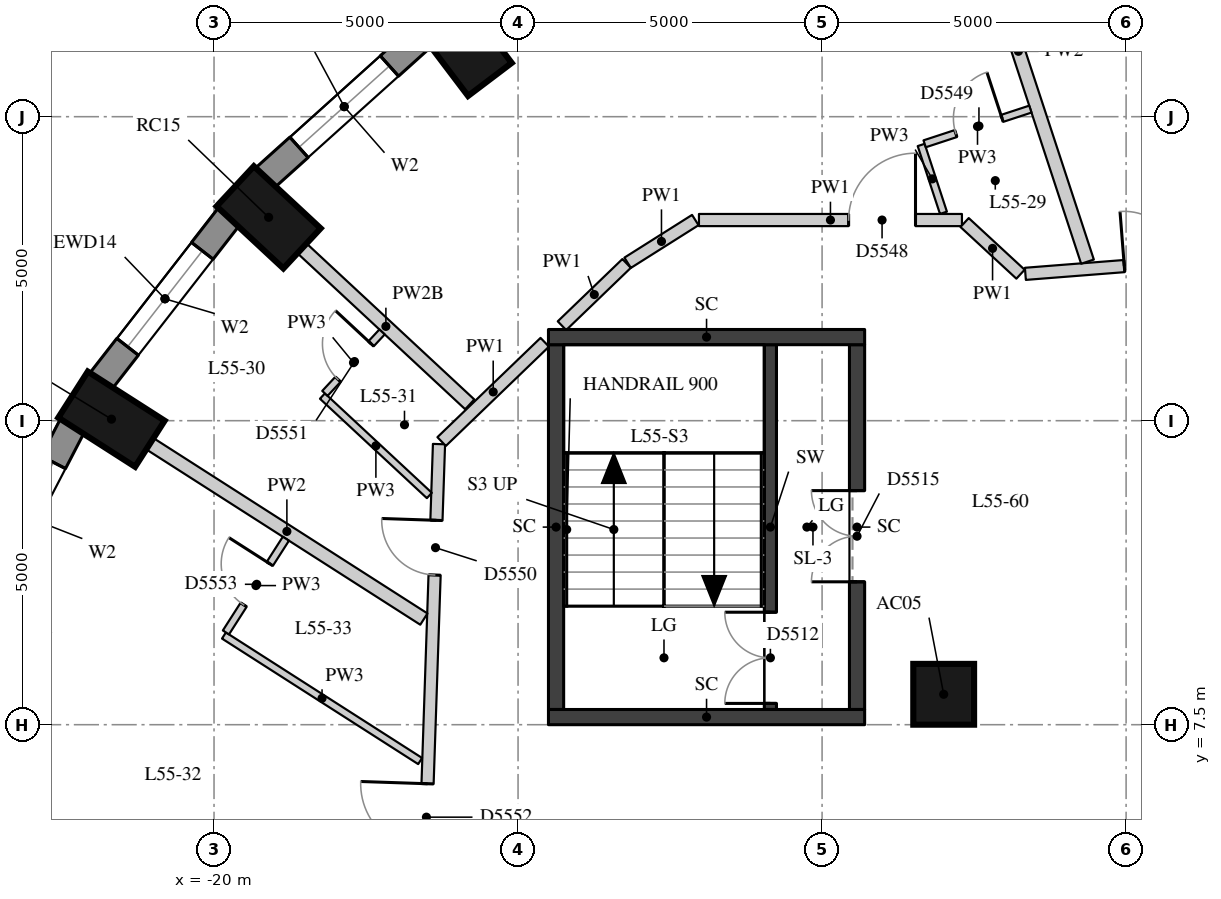
"""IFC4 building model, lengths in metres.
Left out: names, types, materials, properties, quantities, classifications, styles, units other than length and angle.
Written with IfcOpenShell. Run it as: python <this file> out.ifc"""

import sys

from ifc_helpers import new_model, si_unit, direction, frame, frame_2d, origin, origin_2d, place, context, subcontext, project, spatial, rectangle, extrude, element, fill, save


model = new_model("IFC4")
c1 = context("Model", 3, precision=1e-05, world=origin(), true_north=direction((0.0, 1.0)))
c2 = subcontext(c1, "Body", "Model", "MODEL_VIEW")
j1 = project(units=[si_unit("LENGTHUNIT", "METRE"), si_unit("PLANEANGLEUNIT", "RADIAN")], contexts=[c1])
p1 = place(None, origin())
s1 = spatial("IfcSite", under=j1, at=p1, CompositionType="ELEMENT")
p2 = place(p1, origin())
s2 = spatial("IfcBuilding", under=s1, at=p2, CompositionType="ELEMENT")
p3 = place(p2, frame((0.0, 0.0, 195.8)))
s3 = spatial("IfcBuildingStorey", under=s2, at=p3, CompositionType="ELEMENT", Elevation=195.8)
for number, where, z_axis, x_axis in (
    (1, (-15.916, 18.71, 0.0), (0.0, 0.0, 1.0), (-0.604, 0.797, 0.0)),
    (2, (-19.102, 15.845, 0.0), (0.0, 0.0, 1.0), (-0.732, 0.681, 0.0)),
    (3, (-21.687, 12.525, 0.0), (0.0, 0.0, 1.0), (-0.842, 0.539, 0.0)),
):
    element("IfcColumn", number, at=place(p3, frame(where, z_axis=z_axis, x_axis=x_axis)), inside=s3, PredefinedType="COLUMN", context=c2, shape_type="SweptSolid", body=[
        extrude(rectangle(XDim=1.5, YDim=0.9, at=origin_2d()), origin(), (0.0, 0.0, 1.0), 3.3),
    ])
p4 = place(p3, frame((-8.0, 8.0, 0.0), z_axis=(0.0, 0.0, 1.0), x_axis=(1.0, 0.0, 0.0)))
e4 = element("IfcColumn", 4, at=p4, inside=s3, PredefinedType="COLUMN", context=c2, shape_type="SweptSolid", body=[
    extrude(rectangle(XDim=1.0, YDim=1.0, at=origin_2d()), origin(), (0.0, 0.0, 1.0), 3.3),
])
p5 = place(p3, frame((-16.553, 18.84, 0.0), z_axis=(0.0, 0.0, 1.0), x_axis=(-0.743442727602, -0.668799604348, 0.0)))
e5 = element("IfcWall", 5, at=p5, inside=s3, PredefinedType="SOLIDWALL", context=c2, shape_type="SweptSolid", body=[
    extrude(rectangle(XDim=3.513, YDim=0.45, at=frame_2d((1.756, 0.0))), origin(), (0.0, 0.0, 1.0), 3.02),
])
p6 = place(p5, frame((0.756, 0.0, 0.4)))
e6 = element("IfcOpeningElement", 6, at=p6, cuts=e5, PredefinedType="OPENING", context=c2, shape_type="SweptSolid", body=[
    extrude(rectangle(XDim=2.0, YDim=1.75, at=frame_2d((1.0, 0.875))), frame((0.0, 0.235, 0.0), z_axis=(0.0, -1.0, 0.0), x_axis=(1.0, 0.0, 0.0)), (0.0, 0.0, 1.0), 0.47),
])
p7 = place(p3, frame((-19.751, 15.861, 0.0), z_axis=(0.0, 0.0, 1.0), x_axis=(-0.614220816451, -0.789134201919, 0.0)))
e7 = element("IfcWall", 7, at=p7, inside=s3, PredefinedType="SOLIDWALL", context=c2, shape_type="SweptSolid", body=[
    extrude(rectangle(XDim=3.438, YDim=0.45, at=frame_2d((1.719, 0.0))), origin(), (0.0, 0.0, 1.0), 3.02),
])
p8 = place(p7, frame((0.719, 0.0, 0.4)))
e8 = element("IfcOpeningElement", 8, at=p8, cuts=e7, PredefinedType="OPENING", context=c2, shape_type="SweptSolid", body=[
    extrude(rectangle(XDim=2.0, YDim=1.75, at=frame_2d((1.0, 0.875))), frame((0.0, 0.235, 0.0), z_axis=(0.0, -1.0, 0.0), x_axis=(1.0, 0.0, 0.0)), (0.0, 0.0, 1.0), 0.47),
])
p9 = place(p3, frame((-22.327, 12.424, 0.0), z_axis=(0.0, 0.0, 1.0), x_axis=(-0.460232593174, -0.887798378113, 0.0)))
e9 = element("IfcWall", 9, at=p9, inside=s3, PredefinedType="SOLIDWALL", context=c2, shape_type="SweptSolid", body=[
    extrude(rectangle(XDim=3.371, YDim=0.45, at=frame_2d((1.685, 0.0))), origin(), (0.0, 0.0, 1.0), 3.02),
])
p10 = place(p9, frame((0.685, 0.0, 0.4)))
e10 = element("IfcOpeningElement", 10, at=p10, cuts=e9, PredefinedType="OPENING", context=c2, shape_type="SweptSolid", body=[
    extrude(rectangle(XDim=2.0, YDim=1.75, at=frame_2d((1.0, 0.875))), frame((0.0, 0.235, 0.0), z_axis=(0.0, -1.0, 0.0), x_axis=(1.0, 0.0, 0.0)), (0.0, 0.0, 1.0), 0.47),
])
p11 = place(p3, frame((-10.85, 7.75, 0.0), z_axis=(0.0, 0.0, 1.0), x_axis=(0.0, 1.0, 0.0)))
e11 = element("IfcWall", 11, at=p11, inside=s3, PredefinedType="SHEAR", context=c2, shape_type="SweptSolid", body=[
    extrude(rectangle(XDim=6.0, YDim=0.2, at=frame_2d((3.0, 0.0))), origin(), (0.0, 0.0, 1.0), 3.02),
])
p12 = place(p11, frame((0.1, 0.0, 0.0)))
e12 = element("IfcOpeningElement", 12, at=p12, cuts=e11, PredefinedType="OPENING", context=c2, shape_type="SweptSolid", body=[
    extrude(rectangle(XDim=1.5, YDim=2.1, at=frame_2d((0.75, 1.05))), frame((0.0, 0.11, 0.0), z_axis=(0.0, -1.0, 0.0), x_axis=(1.0, 0.0, 0.0)), (0.0, 0.0, 1.0), 0.22),
])
p13 = place(p3, frame((-14.375, 7.75, -0.28), z_axis=(0.0, 0.0, 1.0), x_axis=(0.0, 1.0, 0.0)))
e13 = element("IfcWall", 13, at=p13, inside=s3, PredefinedType="SHEAR", context=c2, shape_type="SweptSolid", body=[
    extrude(rectangle(XDim=6.0, YDim=0.25, at=frame_2d((3.0, 0.0))), origin(), (0.0, 0.0, 1.0), 3.3),
])
p14 = place(p3, frame((-9.425, 7.75, -0.28), z_axis=(0.0, 0.0, 1.0), x_axis=(0.0, 1.0, 0.0)))
e14 = element("IfcWall", 14, at=p14, inside=s3, PredefinedType="SHEAR", context=c2, shape_type="SweptSolid", body=[
    extrude(rectangle(XDim=6.0, YDim=0.25, at=frame_2d((3.0, 0.0))), origin(), (0.0, 0.0, 1.0), 3.3),
])
p15 = place(p14, frame((2.1, 0.0, 0.28)))
e15 = element("IfcOpeningElement", 15, at=p15, cuts=e14, PredefinedType="OPENING", context=c2, shape_type="SweptSolid", body=[
    extrude(rectangle(XDim=1.5, YDim=2.1, at=frame_2d((0.75, 1.05))), frame((0.0, 0.135, 0.0), z_axis=(0.0, -1.0, 0.0), x_axis=(1.0, 0.0, 0.0)), (0.0, 0.0, 1.0), 0.27),
])
for number, where, z_axis, x_axis in (
    (16, (-14.5, 13.875, -0.28), (0.0, 0.0, 1.0), (1.0, 0.0, 0.0)),
    (17, (-14.5, 7.625, -0.28), (0.0, 0.0, 1.0), (1.0, 0.0, 0.0)),
):
    element("IfcWall", number, at=place(p3, frame(where, z_axis=z_axis, x_axis=x_axis)), inside=s3, PredefinedType="SHEAR", context=c2, shape_type="SweptSolid", body=[
        extrude(rectangle(XDim=5.2, YDim=0.25, at=frame_2d((2.6, 0.0))), origin(), (0.0, 0.0, 1.0), 3.3),
    ])
p16 = place(p3, frame((-16.76, -1.521, 0.0), z_axis=(0.0, 0.0, 1.0), x_axis=(0.033695560079, 0.999432143385, 0.0)))
e18 = element("IfcWall", 18, at=p16, inside=s3, PredefinedType="PARTITIONING", context=c2, shape_type="SweptSolid", body=[
    extrude(rectangle(XDim=13.643, YDim=0.2, at=frame_2d((6.822, 0.0))), origin(), (0.0, 0.0, 1.0), 3.02),
])
p17 = place(p16, frame((11.489, 0.0, 0.0)))
e19 = element("IfcOpeningElement", 19, at=p17, cuts=e18, PredefinedType="OPENING", context=c2, shape_type="SweptSolid", body=[
    extrude(rectangle(XDim=0.9, YDim=2.1, at=frame_2d((0.45, 1.05))), frame((0.0, 0.11, 0.0), z_axis=(0.0, -1.0, 0.0), x_axis=(1.0, 0.0, 0.0)), (0.0, 0.0, 1.0), 0.22),
])
p18 = place(p16, frame((6.954, 0.0, 0.0)))
e20 = element("IfcOpeningElement", 20, at=p18, cuts=e18, PredefinedType="OPENING", context=c2, shape_type="SweptSolid", body=[
    extrude(rectangle(XDim=1.1, YDim=2.1, at=frame_2d((0.55, 1.05))), frame((0.0, 0.11, 0.0), z_axis=(0.0, -1.0, 0.0), x_axis=(1.0, 0.0, 0.0)), (0.0, 0.0, 1.0), 0.22),
])
p19 = place(p16, frame((2.39, 0.0, 0.0)))
e21 = element("IfcOpeningElement", 21, at=p19, cuts=e18, PredefinedType="OPENING", context=c2, shape_type="SweptSolid", body=[
    extrude(rectangle(XDim=0.9, YDim=2.1, at=frame_2d((0.45, 1.05))), frame((0.0, 0.11, 0.0), z_axis=(0.0, -1.0, 0.0), x_axis=(1.0, 0.0, 0.0)), (0.0, 0.0, 1.0), 0.22),
])
p20 = place(p3, frame((-16.257, 12.157, 0.0), z_axis=(0.0, 0.0, 1.0), x_axis=(0.720356671174, 0.693603825174, 0.0)))
e22 = element("IfcWall", 22, at=p20, inside=s3, PredefinedType="PARTITIONING", context=c2, shape_type="SweptSolid", body=[
    extrude(rectangle(XDim=2.354, YDim=0.2, at=frame_2d((1.177, 0.0))), origin(), (0.0, 0.0, 1.0), 3.02),
])
p21 = place(p3, frame((-14.278, 14.062, 0.0), z_axis=(0.0, 0.0, 1.0), x_axis=(0.720213092954, 0.693752910435, 0.0)))
e23 = element("IfcWall", 23, at=p21, inside=s3, PredefinedType="PARTITIONING", context=c2, shape_type="SweptSolid", body=[
    extrude(rectangle(XDim=1.476, YDim=0.2, at=frame_2d((0.738, 0.0))), origin(), (0.0, 0.0, 1.0), 3.02),
])
p22 = place(p3, frame((-13.198, 15.097, 0.0), z_axis=(0.0, 0.0, 1.0), x_axis=(0.845466863805, 0.534027885234, 0.0)))
e24 = element("IfcWall", 24, at=p22, inside=s3, PredefinedType="PARTITIONING", context=c2, shape_type="SweptSolid", body=[
    extrude(rectangle(XDim=1.316, YDim=0.2, at=frame_2d((0.658, 0.0))), origin(), (0.0, 0.0, 1.0), 3.02),
])
p23 = place(p3, frame((-12.025, 15.8, 0.0), z_axis=(0.0, 0.0, 1.0), x_axis=(1.0, 0.0, 0.0)))
e25 = element("IfcWall", 25, at=p23, inside=s3, PredefinedType="PARTITIONING", context=c2, shape_type="SweptSolid", body=[
    extrude(rectangle(XDim=4.325, YDim=0.2, at=frame_2d((2.163, 0.0))), origin(), (0.0, 0.0, 1.0), 3.02),
])
p24 = place(p23, frame((2.461, 0.0, 0.0)))
e26 = element("IfcOpeningElement", 26, at=p24, cuts=e25, PredefinedType="OPENING", context=c2, shape_type="SweptSolid", body=[
    extrude(rectangle(XDim=1.1, YDim=2.1, at=frame_2d((0.55, 1.05))), frame((0.0, 0.11, 0.0), z_axis=(0.0, -1.0, 0.0), x_axis=(1.0, 0.0, 0.0)), (0.0, 0.0, 1.0), 0.22),
])
p25 = place(p3, frame((-7.656, 15.759, 0.0), z_axis=(0.0, 0.0, 1.0), x_axis=(0.734444455547, -0.678668801196, 0.0)))
e27 = element("IfcWall", 27, at=p25, inside=s3, PredefinedType="PARTITIONING", context=c2, shape_type="SweptSolid", body=[
    extrude(rectangle(XDim=1.252, YDim=0.2, at=frame_2d((0.626, 0.0))), origin(), (0.0, 0.0, 1.0), 3.02),
])
p26 = place(p3, frame((-6.656, 14.915, 0.0), z_axis=(0.0, 0.0, 1.0), x_axis=(0.99693112817, 0.07828362335, 0.0)))
e28 = element("IfcWall", 28, at=p26, inside=s3, PredefinedType="PARTITIONING", context=c2, shape_type="SweptSolid", body=[
    extrude(rectangle(XDim=10.61, YDim=0.2, at=frame_2d((5.305, 0.0))), origin(), (0.0, 0.0, 1.0), 2.42),
])
p27 = place(p26, frame((7.773, 0.0, 0.0)))
e29 = element("IfcOpeningElement", 29, at=p27, cuts=e28, PredefinedType="OPENING", context=c2, shape_type="SweptSolid", body=[
    extrude(rectangle(XDim=0.9, YDim=2.1, at=frame_2d((0.45, 1.05))), frame((0.0, 0.11, 0.0), z_axis=(0.0, -1.0, 0.0), x_axis=(1.0, 0.0, 0.0)), (0.0, 0.0, 1.0), 0.22),
])
p28 = place(p26, frame((4.608, 0.0, 0.0)))
e30 = element("IfcOpeningElement", 30, at=p28, cuts=e28, PredefinedType="OPENING", context=c2, shape_type="SweptSolid", body=[
    extrude(rectangle(XDim=0.9, YDim=2.1, at=frame_2d((0.45, 1.05))), frame((0.0, 0.11, 0.0), z_axis=(0.0, -1.0, 0.0), x_axis=(1.0, 0.0, 0.0)), (0.0, 0.0, 1.0), 0.22),
])
p29 = place(p26, frame((1.632, 0.0, 0.0)))
e31 = element("IfcOpeningElement", 31, at=p29, cuts=e28, PredefinedType="OPENING", context=c2, shape_type="SweptSolid", body=[
    extrude(rectangle(XDim=0.9, YDim=2.1, at=frame_2d((0.45, 1.05))), frame((0.0, 0.11, 0.0), z_axis=(0.0, -1.0, 0.0), x_axis=(1.0, 0.0, 0.0)), (0.0, 0.0, 1.0), 0.22),
])
p30 = place(p3, frame((-7.907, 22.035, 0.0), z_axis=(0.0, 0.0, 1.0), x_axis=(0.311980831408, -0.950088396326, 0.0)))
e32 = element("IfcWall", 32, at=p30, inside=s3, PredefinedType="PARTITIONING", context=c2, shape_type="SweptSolid", body=[
    extrude(rectangle(XDim=7.283, YDim=0.22, at=frame_2d((3.642, 0.0))), origin(), (0.0, 0.0, 1.0), 3.02),
])
p31 = place(p3, frame((-18.553, 15.334, 0.0), z_axis=(0.0, 0.0, 1.0), x_axis=(0.732303975018, -0.680977891105, 0.0)))
e33 = element("IfcWall", 33, at=p31, inside=s3, PredefinedType="PARTITIONING", context=c2, shape_type="SweptSolid", body=[
    extrude(rectangle(XDim=3.767, YDim=0.22, at=frame_2d((1.884, 0.0))), origin(), (0.0, 0.0, 1.0), 2.57),
])
p32 = place(p3, frame((-21.055, 12.121, 0.0), z_axis=(0.0, 0.0, 1.0), x_axis=(0.842281345898, -0.539038156675, 0.0)))
e34 = element("IfcWall", 34, at=p32, inside=s3, PredefinedType="PARTITIONING", context=c2, shape_type="SweptSolid", body=[
    extrude(rectangle(XDim=5.35, YDim=0.22, at=frame_2d((2.675, 0.0))), origin(), (0.0, 0.0, 1.0), 3.02),
])
p33 = place(p3, frame((-8.004, 15.919, 0.0), z_axis=(0.0, 0.0, 1.0), x_axis=(-0.31198444573, 0.950087209483, 0.0)))
e35 = element("IfcWall", 35, at=p33, inside=s3, PredefinedType="PARTITIONING", context=c2, shape_type="SweptSolid", body=[
    extrude(rectangle(XDim=1.175, YDim=0.12, at=frame_2d((0.587, 0.0))), origin(), (0.0, 0.0, 1.0), 3.02),
])
p34 = place(p3, frame((-16.459, 11.27, 0.0), z_axis=(0.0, 0.0, 1.0), x_axis=(-0.732311710068, 0.68096957296, 0.0)))
e36 = element("IfcWall", 36, at=p34, inside=s3, PredefinedType="PARTITIONING", context=c2, shape_type="SweptSolid", body=[
    extrude(rectangle(XDim=2.401, YDim=0.12, at=frame_2d((1.201, 0.0))), origin(), (0.0, 0.0, 1.0), 3.02),
])
p35 = place(p3, frame((-16.61, 6.902, 0.0), z_axis=(0.0, 0.0, 1.0), x_axis=(-0.842288763401, 0.539026566181, 0.0)))
e37 = element("IfcWall", 37, at=p35, inside=s3, PredefinedType="PARTITIONING", context=c2, shape_type="SweptSolid", body=[
    extrude(rectangle(XDim=3.83, YDim=0.12, at=frame_2d((1.915, 0.0))), origin(), (0.0, 0.0, 1.0), 3.02),
])
p36 = place(p3, frame((-8.313, 17.054, 0.0), z_axis=(0.0, 0.0, 1.0), x_axis=(0.950153758954, 0.311781709446, 0.0)))
e38 = element("IfcWall", 38, at=p36, inside=s3, PredefinedType="PARTITIONING", context=c2, shape_type="SweptSolid", body=[
    extrude(rectangle(XDim=1.83, YDim=0.12, at=frame_2d((0.915, 0.0))), origin(), (0.0, 0.0, 1.0), 3.02),
])
p37 = place(p36, frame((0.54, 0.0, 0.0)))
e39 = element("IfcOpeningElement", 39, at=p37, cuts=e38, PredefinedType="OPENING", context=c2, shape_type="SweptSolid", body=[
    extrude(rectangle(XDim=0.8, YDim=2.1, at=frame_2d((0.4, 1.05))), frame((0.0, 0.07, 0.0), z_axis=(0.0, -1.0, 0.0), x_axis=(1.0, 0.0, 0.0)), (0.0, 0.0, 1.0), 0.14),
])
p38 = place(p3, frame((-18.177, 12.949, 0.0), z_axis=(0.0, 0.0, 1.0), x_axis=(0.681081886823, 0.732207254431, 0.0)))
e40 = element("IfcWall", 40, at=p38, inside=s3, PredefinedType="PARTITIONING", context=c2, shape_type="SweptSolid", body=[
    extrude(rectangle(XDim=1.38, YDim=0.12, at=frame_2d((0.69, 0.0))), origin(), (0.0, 0.0, 1.0), 3.02),
])
p39 = place(p38, frame((0.315, 0.0, 0.0)))
e41 = element("IfcOpeningElement", 41, at=p39, cuts=e40, PredefinedType="OPENING", context=c2, shape_type="SweptSolid", body=[
    extrude(rectangle(XDim=0.8, YDim=2.1, at=frame_2d((0.4, 1.05))), frame((0.0, 0.07, 0.0), z_axis=(0.0, -1.0, 0.0), x_axis=(1.0, 0.0, 0.0)), (0.0, 0.0, 1.0), 0.14),
])
p40 = place(p3, frame((-19.804, 9.017, 0.0), z_axis=(0.0, 0.0, 1.0), x_axis=(0.538962837458, 0.842329543492, 0.0)))
e42 = element("IfcWall", 42, at=p40, inside=s3, PredefinedType="PARTITIONING", context=c2, shape_type="SweptSolid", body=[
    extrude(rectangle(XDim=1.83, YDim=0.12, at=frame_2d((0.915, 0.0))), origin(), (0.0, 0.0, 1.0), 3.02),
])
p41 = place(p40, frame((0.54, 0.0, 0.0)))
e43 = element("IfcOpeningElement", 43, at=p41, cuts=e42, PredefinedType="OPENING", context=c2, shape_type="SweptSolid", body=[
    extrude(rectangle(XDim=0.8, YDim=2.1, at=frame_2d((0.4, 1.05))), frame((0.0, 0.07, 0.0), z_axis=(0.0, -1.0, 0.0), x_axis=(1.0, 0.0, 0.0)), (0.0, 0.0, 1.0), 0.14),
])
p42 = place(p6, origin())
e44 = element("IfcWindow", 44, at=p42, inside=s3, PartitioningType="SINGLE_PANEL", PredefinedType="WINDOW", context=c2, shape_type="SweptSolid", body=[
    extrude(rectangle(XDim=2.0, YDim=1.75, at=frame_2d((1.0, 0.875))), frame((0.0, 0.035, 0.0), z_axis=(0.0, -1.0, 0.0), x_axis=(1.0, 0.0, 0.0)), (0.0, 0.0, 1.0), 0.06),
])
fill(e6, e44)
p43 = place(p8, origin())
e45 = element("IfcWindow", 45, at=p43, inside=s3, PartitioningType="SINGLE_PANEL", PredefinedType="WINDOW", context=c2, shape_type="SweptSolid", body=[
    extrude(rectangle(XDim=2.0, YDim=1.75, at=frame_2d((1.0, 0.875))), frame((0.0, 0.035, 0.0), z_axis=(0.0, -1.0, 0.0), x_axis=(1.0, 0.0, 0.0)), (0.0, 0.0, 1.0), 0.06),
])
fill(e8, e45)
p44 = place(p10, origin())
e46 = element("IfcWindow", 46, at=p44, inside=s3, PartitioningType="SINGLE_PANEL", PredefinedType="WINDOW", context=c2, shape_type="SweptSolid", body=[
    extrude(rectangle(XDim=2.0, YDim=1.75, at=frame_2d((1.0, 0.875))), frame((0.0, 0.035, 0.0), z_axis=(0.0, -1.0, 0.0), x_axis=(1.0, 0.0, 0.0)), (0.0, 0.0, 1.0), 0.06),
])
fill(e10, e46)
p45 = place(p12, origin())
e47 = element("IfcDoor", 47, at=p45, inside=s3, OperationType="DOUBLE_DOOR_SINGLE_SWING", PredefinedType="DOOR", context=c2, shape_type="SweptSolid", body=[
    extrude(rectangle(XDim=1.5, YDim=2.1, at=frame_2d((0.75, 1.05))), frame((0.0, 0.025, 0.0), z_axis=(0.0, -1.0, 0.0), x_axis=(1.0, 0.0, 0.0)), (0.0, 0.0, 1.0), 0.05),
])
fill(e12, e47)
p46 = place(p15, origin())
e48 = element("IfcDoor", 48, at=p46, inside=s3, OperationType="DOUBLE_DOOR_SINGLE_SWING", PredefinedType="DOOR", context=c2, shape_type="SweptSolid", body=[
    extrude(rectangle(XDim=1.5, YDim=2.1, at=frame_2d((0.75, 1.05))), frame((0.0, 0.025, 0.0), z_axis=(0.0, -1.0, 0.0), x_axis=(1.0, 0.0, 0.0)), (0.0, 0.0, 1.0), 0.05),
])
fill(e15, e48)
p47 = place(p29, origin())
e49 = element("IfcDoor", 49, at=p47, inside=s3, OperationType="SINGLE_SWING_LEFT", PredefinedType="DOOR", context=c2, shape_type="SweptSolid", body=[
    extrude(rectangle(XDim=0.9, YDim=2.1, at=frame_2d((0.45, 1.05))), frame((0.0, 0.025, 0.0), z_axis=(0.0, -1.0, 0.0), x_axis=(1.0, 0.0, 0.0)), (0.0, 0.0, 1.0), 0.05),
])
fill(e31, e49)
p48 = place(p24, origin())
e50 = element("IfcDoor", 50, at=p48, inside=s3, OperationType="SINGLE_SWING_RIGHT", PredefinedType="DOOR", context=c2, shape_type="SweptSolid", body=[
    extrude(rectangle(XDim=1.1, YDim=2.1, at=frame_2d((0.55, 1.05))), frame((0.0, 0.025, 0.0), z_axis=(0.0, -1.0, 0.0), x_axis=(1.0, 0.0, 0.0)), (0.0, 0.0, 1.0), 0.05),
])
fill(e26, e50)
p49 = place(p37, origin())
e51 = element("IfcDoor", 51, at=p49, inside=s3, OperationType="SINGLE_SWING_RIGHT", PredefinedType="DOOR", context=c2, shape_type="SweptSolid", body=[
    extrude(rectangle(XDim=0.8, YDim=2.1, at=frame_2d((0.4, 1.05))), frame((0.0, 0.025, 0.0), z_axis=(0.0, -1.0, 0.0), x_axis=(1.0, 0.0, 0.0)), (0.0, 0.0, 1.0), 0.05),
])
fill(e39, e51)
p50 = place(p17, origin())
e52 = element("IfcDoor", 52, at=p50, inside=s3, OperationType="SINGLE_SWING_RIGHT", PredefinedType="DOOR", context=c2, shape_type="SweptSolid", body=[
    extrude(rectangle(XDim=0.9, YDim=2.1, at=frame_2d((0.45, 1.05))), frame((0.0, 0.025, 0.0), z_axis=(0.0, -1.0, 0.0), x_axis=(1.0, 0.0, 0.0)), (0.0, 0.0, 1.0), 0.05),
])
fill(e19, e52)
p51 = place(p39, origin())
e53 = element("IfcDoor", 53, at=p51, inside=s3, OperationType="SINGLE_SWING_RIGHT", PredefinedType="DOOR", context=c2, shape_type="SweptSolid", body=[
    extrude(rectangle(XDim=0.8, YDim=2.1, at=frame_2d((0.4, 1.05))), frame((0.0, 0.025, 0.0), z_axis=(0.0, -1.0, 0.0), x_axis=(1.0, 0.0, 0.0)), (0.0, 0.0, 1.0), 0.05),
])
fill(e41, e53)
p52 = place(p18, origin())
e54 = element("IfcDoor", 54, at=p52, inside=s3, OperationType="SINGLE_SWING_RIGHT", PredefinedType="DOOR", context=c2, shape_type="SweptSolid", body=[
    extrude(rectangle(XDim=1.1, YDim=2.1, at=frame_2d((0.55, 1.05))), frame((0.0, 0.025, 0.0), z_axis=(0.0, -1.0, 0.0), x_axis=(1.0, 0.0, 0.0)), (0.0, 0.0, 1.0), 0.05),
])
fill(e20, e54)
p53 = place(p41, origin())
e55 = element("IfcDoor", 55, at=p53, inside=s3, OperationType="SINGLE_SWING_RIGHT", PredefinedType="DOOR", context=c2, shape_type="SweptSolid", body=[
    extrude(rectangle(XDim=0.8, YDim=2.1, at=frame_2d((0.4, 1.05))), frame((0.0, 0.025, 0.0), z_axis=(0.0, -1.0, 0.0), x_axis=(1.0, 0.0, 0.0)), (0.0, 0.0, 1.0), 0.05),
])
fill(e43, e55)
save(model, sys.argv[1])
